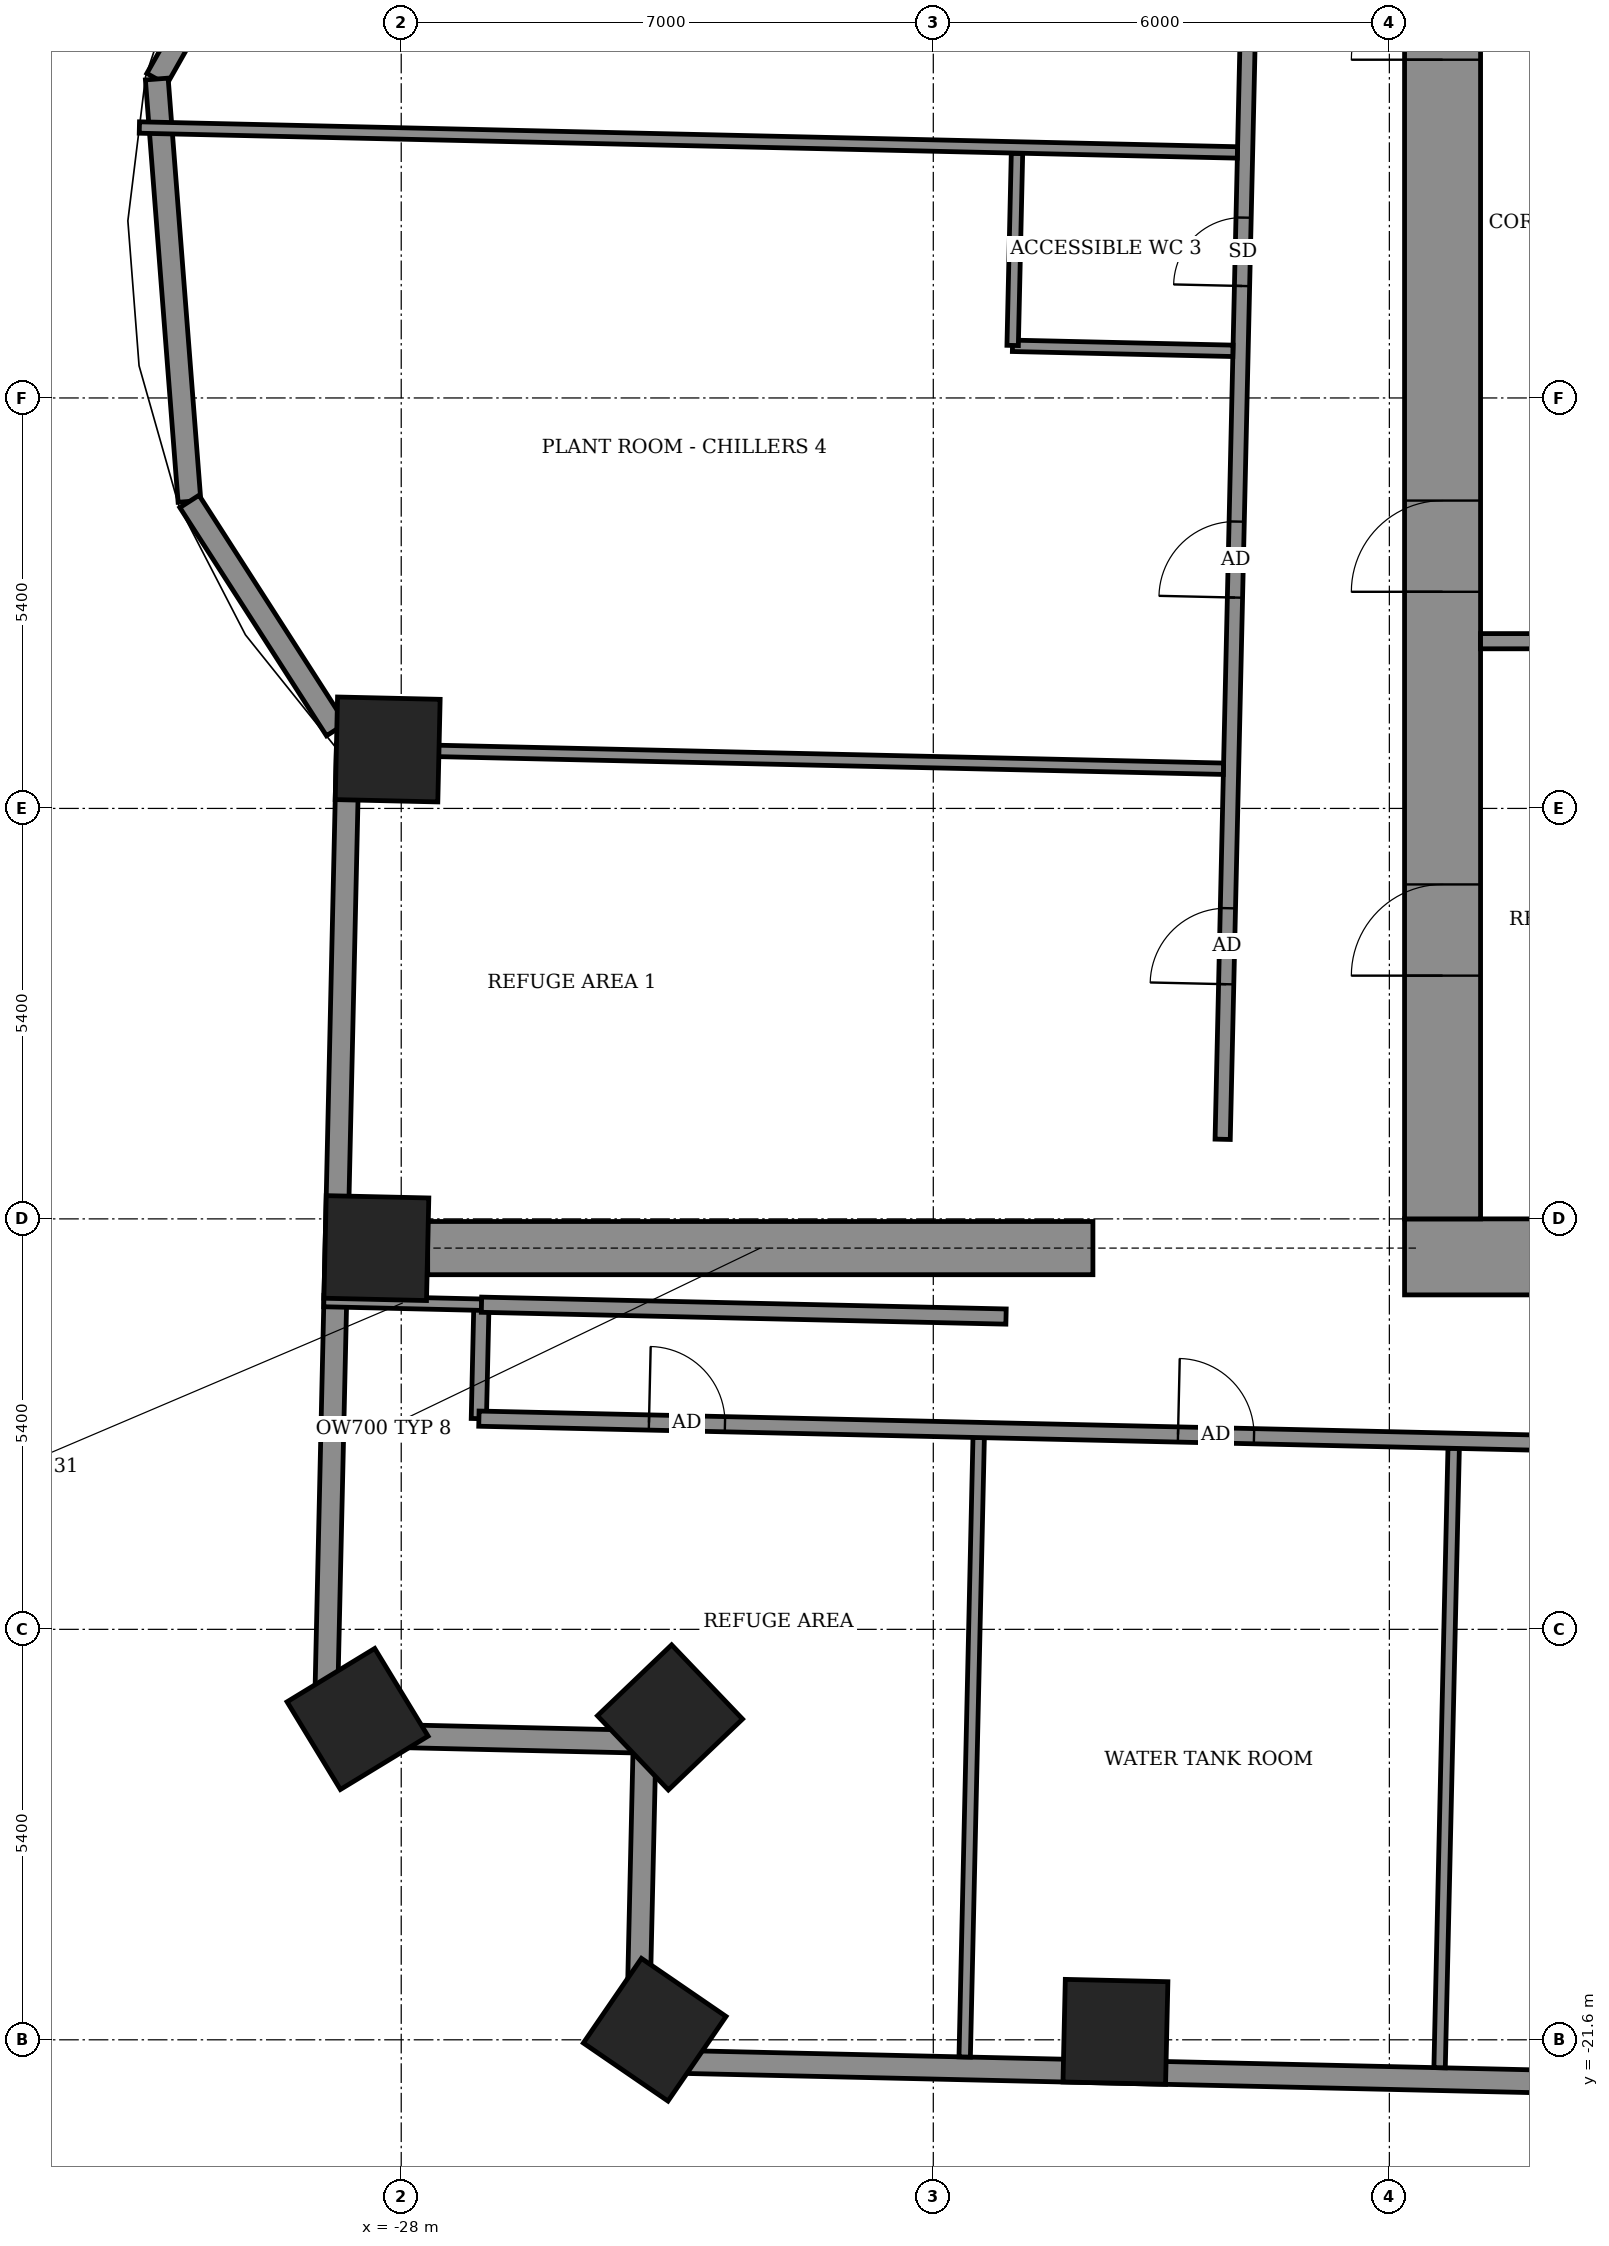
"""IFC4 building model, lengths in metres.
Left out: names, types, materials, properties, quantities, classifications, styles, units other than length and angle.
Written with IfcOpenShell. Run it as: python <this file> out.ifc"""

import sys

from ifc_helpers import new_model, si_unit, direction, frame, frame_2d, origin, origin_2d, place, context, subcontext, project, spatial, rectangle, extrude, element, fill, save


model = new_model("IFC4")
c1 = context("Model", 3, precision=1e-05, world=origin(), true_north=direction((0.0, 1.0)))
c2 = subcontext(c1, "Body", "Model", "MODEL_VIEW")
j1 = project(units=[si_unit("LENGTHUNIT", "METRE"), si_unit("PLANEANGLEUNIT", "RADIAN")], contexts=[c1])
p1 = place(None, origin())
s1 = spatial("IfcSite", under=j1, at=p1, CompositionType="ELEMENT")
p2 = place(p1, origin())
s2 = spatial("IfcBuilding", under=s1, at=p2, CompositionType="ELEMENT")
p3 = place(p2, frame((0.0, 0.0, 119.9)))
s3 = spatial("IfcBuildingStorey", under=s2, at=p3, CompositionType="ELEMENT", Elevation=119.9)
for number, where, z_axis, x_axis in (
    (1, (-28.178, -4.624, -0.55), (0.0, 0.0, 1.0), (-0.023, -1.0, 0.0)),
    (2, (-28.327, -11.184, -0.55), (0.0, 0.0, 1.0), (-0.023, -1.0, 0.0)),
    (3, (-28.574, -17.379, -0.55), (0.0, 0.0, 1.0), (0.52, -0.854, 0.0)),
    (4, (-24.464, -17.359, -0.55), (0.0, 0.0, 1.0), (0.691, -0.723, 0.0)),
    (5, (-24.665, -21.467, -0.55), (0.0, 0.0, 1.0), (0.825, -0.566, 0.0)),
    (6, (-18.604, -21.495, -0.55), (0.0, 0.0, 1.0), (1.0, -0.023, 0.0)),
):
    element("IfcColumn", number, at=place(p3, frame(where, z_axis=z_axis, x_axis=x_axis)), inside=s3, PredefinedType="COLUMN", context=c2, shape_type="SweptSolid", body=[
        extrude(rectangle(XDim=1.35, YDim=1.35, at=origin_2d()), origin(), (0.0, 0.0, 1.0), 5.6),
    ])
p4 = place(p3, frame((-18.9, -11.184, 0.0), z_axis=(0.0, 0.0, 1.0), x_axis=(-1.0, 0.0, 0.0)))
e7 = element("IfcWall", 7, at=p4, inside=s3, PredefinedType="SHEAR", context=c2, shape_type="SweptSolid", body=[
    extrude(rectangle(XDim=8.752, YDim=0.7, at=frame_2d((4.376, 0.0))), origin(), (0.0, 0.0, 1.0), 3.0),
])
p5 = place(p3, frame((-28.557, 8.894, 0.0), z_axis=(0.0, 0.0, 1.0), x_axis=(-0.492589172415, -0.8702619762, 0.0)))
e8 = element("IfcWall", 8, at=p5, inside=s3, PredefinedType="SOLIDWALL", context=c2, shape_type="SweptSolid", body=[
    extrude(rectangle(XDim=5.398, YDim=0.3, at=frame_2d((2.699, 0.0))), origin(), (0.0, 0.0, 1.0), 5.05),
])
p6 = place(p3, frame((-31.216, 4.196, 0.0), z_axis=(0.0, 0.0, 1.0), x_axis=(0.077178825362, -0.997017266107, 0.0)))
e9 = element("IfcWall", 9, at=p6, inside=s3, PredefinedType="SOLIDWALL", context=c2, shape_type="SweptSolid", body=[
    extrude(rectangle(XDim=5.574, YDim=0.3, at=frame_2d((2.787, 0.0))), origin(), (0.0, 0.0, 1.0), 5.05),
])
p7 = place(p3, frame((-30.786, -1.361, 0.0), z_axis=(0.0, 0.0, 1.0), x_axis=(0.54058467792, -0.841289608873, 0.0)))
e10 = element("IfcWall", 10, at=p7, inside=s3, PredefinedType="SOLIDWALL", context=c2, shape_type="SweptSolid", body=[
    extrude(rectangle(XDim=3.568, YDim=0.3, at=frame_2d((1.784, 0.0))), origin(), (0.0, 0.0, 1.0), 5.05),
])
p8 = place(p3, frame((-28.702, -4.557, 0.0), z_axis=(0.0, 0.0, 1.0), x_axis=(-0.022653729471, -0.999743371341, 0.0)))
e11 = element("IfcWall", 11, at=p8, inside=s3, PredefinedType="SOLIDWALL", context=c2, shape_type="SweptSolid", body=[
    extrude(rectangle(XDim=13.03, YDim=0.3, at=frame_2d((6.515, 0.0))), origin(), (0.0, 0.0, 1.0), 5.05),
])
for number, where, z_axis, x_axis in (
    (12, (-28.997, -17.583, 0.0), (0.0, 0.0, 1.0), (1.0, -0.023, 0.0)),
    (13, (-24.798, -17.679, 0.0), (0.0, 0.0, 1.0), (-0.023, -1.0, 0.0)),
):
    element("IfcWall", number, at=place(p3, frame(where, z_axis=z_axis, x_axis=x_axis)), inside=s3, PredefinedType="SOLIDWALL", context=c2, shape_type="SweptSolid", body=[
        extrude(rectangle(XDim=4.2, YDim=0.3, at=frame_2d((2.1, 0.0))), origin(), (0.0, 0.0, 1.0), 5.05),
    ])
p9 = place(p3, frame((-24.894, -21.878, 0.0), z_axis=(0.0, 0.0, 1.0), x_axis=(0.999742689045, -0.022683820265, 0.0)))
e14 = element("IfcWall", 14, at=p9, inside=s3, PredefinedType="SOLIDWALL", context=c2, shape_type="SweptSolid", body=[
    extrude(rectangle(XDim=44.708, YDim=0.3, at=frame_2d((22.354, 0.0))), origin(), (0.0, 0.0, 1.0), 5.05),
])
p10 = place(p3, frame((-20.587, -21.826, 0.0), z_axis=(0.0, 0.0, 1.0), x_axis=(0.022554031278, 0.999745625483, 0.0)))
e15 = element("IfcWall", 15, at=p10, inside=s3, PredefinedType="PARTITIONING", context=c2, shape_type="SweptSolid", body=[
    extrude(rectangle(XDim=8.151, YDim=0.15, at=frame_2d((4.075, 0.0))), origin(), (0.0, 0.0, 1.0), 4.45),
])
p11 = place(p3, frame((-14.339, -21.967, 0.0), z_axis=(0.0, 0.0, 1.0), x_axis=(0.022706435224, 0.999742175663, 0.0)))
e16 = element("IfcWall", 16, at=p11, inside=s3, PredefinedType="PARTITIONING", context=c2, shape_type="SweptSolid", body=[
    extrude(rectangle(XDim=8.15, YDim=0.15, at=frame_2d((4.075, 0.0))), origin(), (0.0, 0.0, 1.0), 4.45),
])
p12 = place(p3, frame((-26.979, -13.428, 0.0), z_axis=(0.0, 0.0, 1.0), x_axis=(0.022617910375, 0.999744182344, 0.0)))
e17 = element("IfcWall", 17, at=p12, inside=s3, PredefinedType="PARTITIONING", context=c2, shape_type="SweptSolid", body=[
    extrude(rectangle(XDim=1.5, YDim=0.2, at=frame_2d((0.75, 0.0))), origin(), (0.0, 0.0, 1.0), 5.05),
])
p13 = place(p3, frame((-26.978, -13.428, 0.0), z_axis=(0.0, 0.0, 1.0), x_axis=(0.999743028707, -0.022668845383, 0.0)))
e18 = element("IfcWall", 18, at=p13, inside=s3, PredefinedType="PARTITIONING", context=c2, shape_type="SweptSolid", body=[
    extrude(rectangle(XDim=14.561, YDim=0.2, at=frame_2d((7.28, 0.0))), origin(), (0.0, 0.0, 1.0), 3.0),
])
p14 = place(p13, frame((2.238, 0.0, 0.0)))
e19 = element("IfcOpeningElement", 19, at=p14, cuts=e18, PredefinedType="OPENING", context=c2, shape_type="SweptSolid", body=[
    extrude(rectangle(XDim=1.0, YDim=2.1, at=frame_2d((0.5, 1.05))), frame((0.0, 0.11, 0.0), z_axis=(0.0, -1.0, 0.0), x_axis=(1.0, 0.0, 0.0)), (0.0, 0.0, 1.0), 0.22),
])
p15 = place(p13, frame((9.2, 0.0, 0.0)))
e20 = element("IfcOpeningElement", 20, at=p15, cuts=e18, PredefinedType="OPENING", context=c2, shape_type="SweptSolid", body=[
    extrude(rectangle(XDim=1.0, YDim=2.1, at=frame_2d((0.5, 1.05))), frame((0.0, 0.11, 0.0), z_axis=(0.0, -1.0, 0.0), x_axis=(1.0, 0.0, 0.0)), (0.0, 0.0, 1.0), 0.22),
])
p16 = place(p3, frame((-29.018, -11.881, 0.0), z_axis=(0.0, 0.0, 1.0), x_axis=(0.999734999765, -0.02302021381, 0.0)))
e21 = element("IfcWall", 21, at=p16, inside=s3, PredefinedType="PARTITIONING", context=c2, shape_type="SweptSolid", body=[
    extrude(rectangle(XDim=2.079, YDim=0.15, at=frame_2d((1.039, 0.0))), origin(), (0.0, 0.0, 1.0), 4.45),
])
p17 = place(p3, frame((-26.944, -11.929, 0.0), z_axis=(0.0, 0.0, 1.0), x_axis=(0.999744585311, -0.022600091627, 0.0)))
e22 = element("IfcWall", 22, at=p17, inside=s3, PredefinedType="PARTITIONING", context=c2, shape_type="SweptSolid", body=[
    extrude(rectangle(XDim=6.903, YDim=0.2, at=frame_2d((3.451, 0.0))), origin(), (0.0, 0.0, 1.0), 5.05),
])
p18 = place(p3, frame((-17.193, -9.753, 0.0), z_axis=(0.0, 0.0, 1.0), x_axis=(0.02270473944, 0.999742214177, 0.0)))
e23 = element("IfcWall", 23, at=p18, inside=s3, PredefinedType="PARTITIONING", context=c2, shape_type="SweptSolid", body=[
    extrude(rectangle(XDim=18.635, YDim=0.2, at=frame_2d((9.317, 0.0))), origin(), (0.0, 0.0, 1.0), 3.0),
])
p19 = place(p18, frame((15.083, 0.0, 0.0)))
e24 = element("IfcOpeningElement", 24, at=p19, cuts=e23, PredefinedType="OPENING", context=c2, shape_type="SweptSolid", body=[
    extrude(rectangle(XDim=1.0, YDim=2.1, at=frame_2d((0.5, 1.05))), frame((0.0, 0.11, 0.0), z_axis=(0.0, -1.0, 0.0), x_axis=(1.0, 0.0, 0.0)), (0.0, 0.0, 1.0), 0.22),
])
p20 = place(p18, frame((7.129, 0.0, 0.0)))
e25 = element("IfcOpeningElement", 25, at=p20, cuts=e23, PredefinedType="OPENING", context=c2, shape_type="SweptSolid", body=[
    extrude(rectangle(XDim=1.0, YDim=2.1, at=frame_2d((0.5, 1.05))), frame((0.0, 0.11, 0.0), z_axis=(0.0, -1.0, 0.0), x_axis=(1.0, 0.0, 0.0)), (0.0, 0.0, 1.0), 0.22),
])
p21 = place(p18, frame((11.229, 0.0, 0.0)))
e26 = element("IfcOpeningElement", 26, at=p21, cuts=e23, PredefinedType="OPENING", context=c2, shape_type="SweptSolid", body=[
    extrude(rectangle(XDim=0.9, YDim=2.1, at=frame_2d((0.45, 1.05))), frame((0.0, 0.11, 0.0), z_axis=(0.0, -1.0, 0.0), x_axis=(1.0, 0.0, 0.0)), (0.0, 0.0, 1.0), 0.22),
])
p22 = place(p18, frame((2.041, 0.0, 0.0)))
e27 = element("IfcOpeningElement", 27, at=p22, cuts=e23, PredefinedType="OPENING", context=c2, shape_type="SweptSolid", body=[
    extrude(rectangle(XDim=1.0, YDim=2.1, at=frame_2d((0.5, 1.05))), frame((0.0, 0.11, 0.0), z_axis=(0.0, -1.0, 0.0), x_axis=(1.0, 0.0, 0.0)), (0.0, 0.0, 1.0), 0.22),
])
p23 = place(p3, frame((-28.553, -4.62, 0.0), z_axis=(0.0, 0.0, 1.0), x_axis=(0.999743020026, -0.022669228257, 0.0)))
e28 = element("IfcWall", 28, at=p23, inside=s3, PredefinedType="PARTITIONING", context=c2, shape_type="SweptSolid", body=[
    extrude(rectangle(XDim=11.373, YDim=0.15, at=frame_2d((5.687, 0.0))), origin(), (0.0, 0.0, 1.0), 5.05),
])
p24 = place(p3, frame((-19.958, 0.686, 0.0), z_axis=(0.0, 0.0, 1.0), x_axis=(0.999741748633, -0.022725229174, 0.0)))
e29 = element("IfcWall", 29, at=p24, inside=s3, PredefinedType="PARTITIONING", context=c2, shape_type="SweptSolid", body=[
    extrude(rectangle(XDim=2.901, YDim=0.15, at=frame_2d((1.45, 0.0))), origin(), (0.0, 0.0, 1.0), 5.05),
])
p25 = place(p3, frame((-19.956, 0.691, 0.0), z_axis=(0.0, 0.0, 1.0), x_axis=(0.022618209135, 0.999744175585, 0.0)))
e30 = element("IfcWall", 30, at=p25, inside=s3, PredefinedType="PARTITIONING", context=c2, shape_type="SweptSolid", body=[
    extrude(rectangle(XDim=2.526, YDim=0.15, at=frame_2d((1.263, 0.0))), origin(), (0.0, 0.0, 1.0), 5.05),
])
p26 = place(p3, frame((-31.445, 3.558, 0.0), z_axis=(0.0, 0.0, 1.0), x_axis=(0.999742140748, -0.022707972439, 0.0)))
e31 = element("IfcWall", 31, at=p26, inside=s3, PredefinedType="PARTITIONING", context=c2, shape_type="SweptSolid", body=[
    extrude(rectangle(XDim=14.45, YDim=0.15, at=frame_2d((7.225, 0.0))), origin(), (0.0, 0.0, 1.0), 4.45),
])
p27 = place(p3, frame((-14.8, -11.3, 0.0), z_axis=(0.0, 0.0, 1.0), x_axis=(1.0, 0.0, 0.0)))
e32 = element("IfcWall", 32, at=p27, inside=s3, PredefinedType="SHEAR", context=c2, shape_type="SweptSolid", body=[
    extrude(rectangle(XDim=29.6, YDim=1.0, at=frame_2d((14.8, 0.0))), origin(), (0.0, 0.0, 1.0), 5.6),
])
p28 = place(p3, frame((-14.3, -10.8, 0.0), z_axis=(0.0, 0.0, 1.0), x_axis=(0.0, 1.0, 0.0)))
e33 = element("IfcWall", 33, at=p28, inside=s3, PredefinedType="SHEAR", context=c2, shape_type="SweptSolid", body=[
    extrude(rectangle(XDim=21.6, YDim=1.0, at=frame_2d((10.8, 0.0))), origin(), (0.0, 0.0, 1.0), 5.6),
])
p29 = place(p28, frame((8.25, 0.0, 0.0)))
e34 = element("IfcOpeningElement", 34, at=p29, cuts=e33, PredefinedType="OPENING", context=c2, shape_type="SweptSolid", body=[
    extrude(rectangle(XDim=1.2, YDim=2.1, at=frame_2d((0.6, 1.05))), frame((0.0, 0.51, 0.0), z_axis=(0.0, -1.0, 0.0), x_axis=(1.0, 0.0, 0.0)), (0.0, 0.0, 1.0), 1.02),
])
p30 = place(p28, frame((15.25, 0.0, 0.0)))
e35 = element("IfcOpeningElement", 35, at=p30, cuts=e33, PredefinedType="OPENING", context=c2, shape_type="SweptSolid", body=[
    extrude(rectangle(XDim=1.2, YDim=2.1, at=frame_2d((0.6, 1.05))), frame((0.0, 0.51, 0.0), z_axis=(0.0, -1.0, 0.0), x_axis=(1.0, 0.0, 0.0)), (0.0, 0.0, 1.0), 1.02),
])
p31 = place(p28, frame((3.2, 0.0, 0.0)))
e36 = element("IfcOpeningElement", 36, at=p31, cuts=e33, PredefinedType="OPENING", context=c2, shape_type="SweptSolid", body=[
    extrude(rectangle(XDim=1.2, YDim=2.1, at=frame_2d((0.6, 1.05))), frame((0.0, 0.51, 0.0), z_axis=(0.0, -1.0, 0.0), x_axis=(1.0, 0.0, 0.0)), (0.0, 0.0, 1.0), 1.02),
])
p32 = place(p3, frame((-13.8, -3.2, 0.0), z_axis=(0.0, 0.0, 1.0), x_axis=(1.0, 0.0, 0.0)))
e37 = element("IfcWall", 37, at=p32, inside=s3, PredefinedType="STANDARD", context=c2, shape_type="SweptSolid", body=[
    extrude(rectangle(XDim=2.9, YDim=0.2, at=frame_2d((1.45, 0.0))), origin(), (0.0, 0.0, 1.0), 5.05),
])
p33 = place(p32, frame((0.85, 0.0, 0.0)))
e38 = element("IfcOpeningElement", 38, at=p33, cuts=e37, PredefinedType="OPENING", context=c2, shape_type="SweptSolid", body=[
    extrude(rectangle(XDim=1.2, YDim=2.1, at=frame_2d((0.6, 1.05))), frame((0.0, 0.11, 0.0), z_axis=(0.0, -1.0, 0.0), x_axis=(1.0, 0.0, 0.0)), (0.0, 0.0, 1.0), 0.22),
])
p34 = place(p14, origin())
e39 = element("IfcDoor", 39, at=p34, inside=s3, OperationType="SINGLE_SWING_LEFT", PredefinedType="DOOR", context=c2, shape_type="SweptSolid", body=[
    extrude(rectangle(XDim=1.0, YDim=2.1, at=frame_2d((0.5, 1.05))), frame((0.0, 0.025, 0.0), z_axis=(0.0, -1.0, 0.0), x_axis=(1.0, 0.0, 0.0)), (0.0, 0.0, 1.0), 0.05),
])
fill(e19, e39)
p35 = place(p15, origin())
e40 = element("IfcDoor", 40, at=p35, inside=s3, OperationType="SINGLE_SWING_RIGHT", PredefinedType="DOOR", context=c2, shape_type="SweptSolid", body=[
    extrude(rectangle(XDim=1.0, YDim=2.1, at=frame_2d((0.5, 1.05))), frame((0.0, 0.025, 0.0), z_axis=(0.0, -1.0, 0.0), x_axis=(1.0, 0.0, 0.0)), (0.0, 0.0, 1.0), 0.05),
])
fill(e20, e40)
p36 = place(p20, origin())
e41 = element("IfcDoor", 41, at=p36, inside=s3, OperationType="SINGLE_SWING_LEFT", PredefinedType="DOOR", context=c2, shape_type="SweptSolid", body=[
    extrude(rectangle(XDim=1.0, YDim=2.1, at=frame_2d((0.5, 1.05))), frame((0.0, 0.025, 0.0), z_axis=(0.0, -1.0, 0.0), x_axis=(1.0, 0.0, 0.0)), (0.0, 0.0, 1.0), 0.05),
])
fill(e25, e41)
p37 = place(p21, origin())
e42 = element("IfcDoor", 42, at=p37, inside=s3, OperationType="SINGLE_SWING_RIGHT", PredefinedType="DOOR", context=c2, shape_type="SweptSolid", body=[
    extrude(rectangle(XDim=0.9, YDim=2.1, at=frame_2d((0.45, 1.05))), frame((0.0, 0.025, 0.0), z_axis=(0.0, -1.0, 0.0), x_axis=(1.0, 0.0, 0.0)), (0.0, 0.0, 1.0), 0.05),
])
fill(e26, e42)
p38 = place(p22, origin())
e43 = element("IfcDoor", 43, at=p38, inside=s3, OperationType="SINGLE_SWING_RIGHT", PredefinedType="DOOR", context=c2, shape_type="SweptSolid", body=[
    extrude(rectangle(XDim=1.0, YDim=2.1, at=frame_2d((0.5, 1.05))), frame((0.0, 0.025, 0.0), z_axis=(0.0, -1.0, 0.0), x_axis=(1.0, 0.0, 0.0)), (0.0, 0.0, 1.0), 0.05),
])
fill(e27, e43)
p39 = place(p29, origin())
e44 = element("IfcDoor", 44, at=p39, inside=s3, OperationType="DOUBLE_DOOR_SINGLE_SWING", PredefinedType="DOOR", context=c2, shape_type="SweptSolid", body=[
    extrude(rectangle(XDim=1.2, YDim=2.1, at=frame_2d((0.6, 1.05))), frame((0.0, 0.025, 0.0), z_axis=(0.0, -1.0, 0.0), x_axis=(1.0, 0.0, 0.0)), (0.0, 0.0, 1.0), 0.05),
])
fill(e34, e44)
p40 = place(p30, origin())
e45 = element("IfcDoor", 45, at=p40, inside=s3, OperationType="DOUBLE_DOOR_SINGLE_SWING", PredefinedType="DOOR", context=c2, shape_type="SweptSolid", body=[
    extrude(rectangle(XDim=1.2, YDim=2.1, at=frame_2d((0.6, 1.05))), frame((0.0, 0.025, 0.0), z_axis=(0.0, -1.0, 0.0), x_axis=(1.0, 0.0, 0.0)), (0.0, 0.0, 1.0), 0.05),
])
fill(e35, e45)
p41 = place(p31, origin())
e46 = element("IfcDoor", 46, at=p41, inside=s3, OperationType="DOUBLE_DOOR_SINGLE_SWING", PredefinedType="DOOR", context=c2, shape_type="SweptSolid", body=[
    extrude(rectangle(XDim=1.2, YDim=2.1, at=frame_2d((0.6, 1.05))), frame((0.0, 0.025, 0.0), z_axis=(0.0, -1.0, 0.0), x_axis=(1.0, 0.0, 0.0)), (0.0, 0.0, 1.0), 0.05),
])
fill(e36, e46)
save(model, sys.argv[1])
